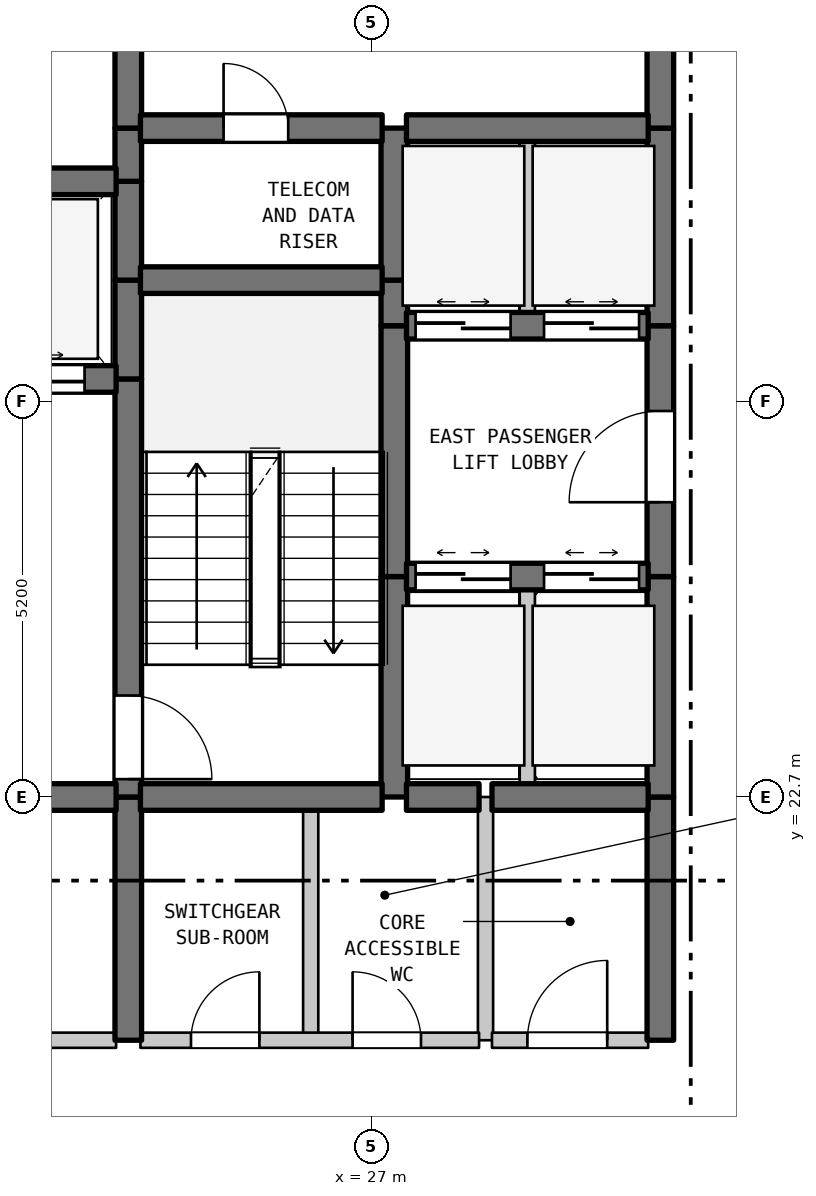
"""IFC4 building model, lengths in metres.
Left out: names, types, materials, properties, quantities, classifications, styles, units other than length and angle.
Written with IfcOpenShell. Run it as: python <this file> out.ifc"""

import sys

from ifc_helpers import new_model, si_unit, direction, frame, frame_2d, origin, place, context, subcontext, project, spatial, rectangle, extrude, element, fill, save


model = new_model("IFC4")
c1 = context("Model", 3, precision=1e-05, world=origin(), true_north=direction((0.0, 1.0)))
c2 = subcontext(c1, "Body", "Model", "MODEL_VIEW")
j1 = project(units=[si_unit("LENGTHUNIT", "METRE"), si_unit("PLANEANGLEUNIT", "RADIAN")], contexts=[c1])
p1 = place(None, origin())
s1 = spatial("IfcSite", under=j1, at=p1, CompositionType="ELEMENT")
p2 = place(p1, origin())
s2 = spatial("IfcBuilding", under=s1, at=p2, CompositionType="ELEMENT")
p3 = place(p2, frame((0.0, 0.0, 109.4)))
s3 = spatial("IfcBuildingStorey", under=s2, at=p3, CompositionType="ELEMENT", Elevation=109.4)
p4 = place(p3, frame((23.8, 19.5, 0.0), z_axis=(0.0, 0.0, 1.0), x_axis=(0.0, 1.0, 0.0)))
e1 = element("IfcWall", 1, at=p4, inside=s3, PredefinedType="SHEAR", context=c2, shape_type="SweptSolid", body=[
    extrude(rectangle(XDim=3.2, YDim=0.35, at=frame_2d((1.6, 0.0))), origin(), (0.0, 0.0, 1.0), 3.385),
])
p5 = place(p3, frame((23.8, 22.7, 0.0), z_axis=(0.0, 0.0, 1.0), x_axis=(0.0, 1.0, 0.0)))
e2 = element("IfcWall", 2, at=p5, inside=s3, PredefinedType="SHEAR", context=c2, shape_type="SweptSolid", body=[
    extrude(rectangle(XDim=5.5, YDim=0.35, at=frame_2d((2.75, 0.0))), origin(), (0.0, 0.0, 1.0), 3.385),
])
p6 = place(p5, frame((0.235, 0.0, 0.0)))
e3 = element("IfcOpeningElement", 3, at=p6, cuts=e2, PredefinedType="OPENING", context=c2, shape_type="SweptSolid", body=[
    extrude(rectangle(XDim=1.1, YDim=2.15, at=frame_2d((0.55, 1.075))), frame((0.0, 0.185, 0.0), z_axis=(0.0, -1.0, 0.0), x_axis=(1.0, 0.0, 0.0)), (0.0, 0.0, 1.0), 0.37),
])
for number, where, z_axis, x_axis in (
    (4, (23.8, 28.2, 0.0), (0.0, 0.0, 1.0), (0.0, 1.0, 0.0)),
    (5, (23.8, 29.5, 0.0), (0.0, 0.0, 1.0), (0.0, 1.0, 0.0)),
):
    element("IfcWall", number, at=place(p3, frame(where, z_axis=z_axis, x_axis=x_axis)), inside=s3, PredefinedType="SHEAR", context=c2, shape_type="SweptSolid", body=[
        extrude(rectangle(XDim=1.3, YDim=0.35, at=frame_2d((0.65, 0.0))), origin(), (0.0, 0.0, 1.0), 3.385),
    ])
p7 = place(p3, frame((23.8, 30.8, 0.0), z_axis=(0.0, 0.0, 1.0), x_axis=(0.0, 1.0, 0.0)))
e6 = element("IfcWall", 6, at=p7, inside=s3, PredefinedType="SHEAR", context=c2, shape_type="SweptSolid", body=[
    extrude(rectangle(XDim=0.7, YDim=0.35, at=frame_2d((0.35, 0.0))), origin(), (0.0, 0.0, 1.0), 3.385),
])
p8 = place(p3, frame((23.8, 31.5, 0.0), z_axis=(0.0, 0.0, 1.0), x_axis=(0.0, 1.0, 0.0)))
e7 = element("IfcWall", 7, at=p8, inside=s3, PredefinedType="SHEAR", context=c2, shape_type="SweptSolid", body=[
    extrude(rectangle(XDim=3.5, YDim=0.35, at=frame_2d((1.75, 0.0))), origin(), (0.0, 0.0, 1.0), 3.385),
])
p9 = place(p8, frame((1.127, 0.0, 0.0)))
e8 = element("IfcOpeningElement", 8, at=p9, cuts=e7, PredefinedType="OPENING", context=c2, shape_type="SweptSolid", body=[
    extrude(rectangle(XDim=1.1, YDim=2.15, at=frame_2d((0.55, 1.075))), frame((0.0, 0.185, 0.0), z_axis=(0.0, -1.0, 0.0), x_axis=(1.0, 0.0, 0.0)), (0.0, 0.0, 1.0), 0.37),
])
p10 = place(p3, frame((26.2, 19.5, 0.0), z_axis=(0.0, 0.0, 1.0), x_axis=(0.0, 1.0, 0.0)))
e9 = element("IfcWall", 9, at=p10, inside=s3, PredefinedType="STANDARD", context=c2, shape_type="SweptSolid", body=[
    extrude(rectangle(XDim=3.2, YDim=0.2, at=frame_2d((1.6, 0.0))), origin(), (0.0, 0.0, 1.0), 3.385),
])
p11 = place(p3, frame((27.3, 22.7, 0.0), z_axis=(0.0, 0.0, 1.0), x_axis=(0.0, 1.0, 0.0)))
e10 = element("IfcWall", 10, at=p11, inside=s3, PredefinedType="SHEAR", context=c2, shape_type="SweptSolid", body=[
    extrude(rectangle(XDim=2.9, YDim=0.35, at=frame_2d((1.45, 0.0))), origin(), (0.0, 0.0, 1.0), 3.385),
])
p12 = place(p3, frame((27.3, 25.6, 0.0), z_axis=(0.0, 0.0, 1.0), x_axis=(0.0, 1.0, 0.0)))
e11 = element("IfcWall", 11, at=p12, inside=s3, PredefinedType="SHEAR", context=c2, shape_type="SweptSolid", body=[
    extrude(rectangle(XDim=3.3, YDim=0.35, at=frame_2d((1.65, 0.0))), origin(), (0.0, 0.0, 1.0), 3.385),
])
p13 = place(p3, frame((27.3, 28.9, 0.0), z_axis=(0.0, 0.0, 1.0), x_axis=(0.0, 1.0, 0.0)))
e12 = element("IfcWall", 12, at=p13, inside=s3, PredefinedType="SHEAR", context=c2, shape_type="SweptSolid", body=[
    extrude(rectangle(XDim=0.6, YDim=0.35, at=frame_2d((0.3, 0.0))), origin(), (0.0, 0.0, 1.0), 3.385),
])
p14 = place(p3, frame((27.3, 29.5, 0.0), z_axis=(0.0, 0.0, 1.0), x_axis=(0.0, 1.0, 0.0)))
e13 = element("IfcWall", 13, at=p14, inside=s3, PredefinedType="SHEAR", context=c2, shape_type="SweptSolid", body=[
    extrude(rectangle(XDim=2.0, YDim=0.35, at=frame_2d((1.0, 0.0))), origin(), (0.0, 0.0, 1.0), 3.385),
])
p15 = place(p3, frame((28.5, 19.5, 0.0), z_axis=(0.0, 0.0, 1.0), x_axis=(0.0, 1.0, 0.0)))
e14 = element("IfcWall", 14, at=p15, inside=s3, PredefinedType="STANDARD", context=c2, shape_type="SweptSolid", body=[
    extrude(rectangle(XDim=3.2, YDim=0.2, at=frame_2d((1.6, 0.0))), origin(), (0.0, 0.0, 1.0), 3.385),
])
p16 = place(p3, frame((29.05, 22.7, 0.0), z_axis=(0.0, 0.0, 1.0), x_axis=(0.0, 1.0, 0.0)))
e15 = element("IfcWall", 15, at=p16, inside=s3, PredefinedType="STANDARD", context=c2, shape_type="SweptSolid", body=[
    extrude(rectangle(XDim=2.9, YDim=0.2, at=frame_2d((1.45, 0.0))), origin(), (0.0, 0.0, 1.0), 3.385),
])
p17 = place(p3, frame((29.05, 28.9, 0.0), z_axis=(0.0, 0.0, 1.0), x_axis=(0.0, 1.0, 0.0)))
e16 = element("IfcWall", 16, at=p17, inside=s3, PredefinedType="STANDARD", context=c2, shape_type="SweptSolid", body=[
    extrude(rectangle(XDim=2.6, YDim=0.2, at=frame_2d((1.3, 0.0))), origin(), (0.0, 0.0, 1.0), 3.385),
])
p18 = place(p3, frame((30.8, 19.5, 0.0), z_axis=(0.0, 0.0, 1.0), x_axis=(0.0, 1.0, 0.0)))
e17 = element("IfcWall", 17, at=p18, inside=s3, PredefinedType="SHEAR", context=c2, shape_type="SweptSolid", body=[
    extrude(rectangle(XDim=3.2, YDim=0.35, at=frame_2d((1.6, 0.0))), origin(), (0.0, 0.0, 1.0), 3.385),
])
p19 = place(p3, frame((30.8, 22.7, 0.0), z_axis=(0.0, 0.0, 1.0), x_axis=(0.0, 1.0, 0.0)))
e18 = element("IfcWall", 18, at=p19, inside=s3, PredefinedType="SHEAR", context=c2, shape_type="SweptSolid", body=[
    extrude(rectangle(XDim=2.9, YDim=0.35, at=frame_2d((1.45, 0.0))), origin(), (0.0, 0.0, 1.0), 3.385),
])
p20 = place(p3, frame((30.8, 25.6, 0.0), z_axis=(0.0, 0.0, 1.0), x_axis=(0.0, 1.0, 0.0)))
e19 = element("IfcWall", 19, at=p20, inside=s3, PredefinedType="SHEAR", context=c2, shape_type="SweptSolid", body=[
    extrude(rectangle(XDim=3.3, YDim=0.35, at=frame_2d((1.65, 0.0))), origin(), (0.0, 0.0, 1.0), 3.385),
])
p21 = place(p20, frame((0.978, 0.0, 0.0)))
e20 = element("IfcOpeningElement", 20, at=p21, cuts=e19, PredefinedType="OPENING", context=c2, shape_type="SweptSolid", body=[
    extrude(rectangle(XDim=1.2, YDim=2.2, at=frame_2d((0.6, 1.1))), frame((0.0, 0.185, 0.0), z_axis=(0.0, -1.0, 0.0), x_axis=(1.0, 0.0, 0.0)), (0.0, 0.0, 1.0), 0.37),
])
p22 = place(p3, frame((30.8, 28.9, 0.0), z_axis=(0.0, 0.0, 1.0), x_axis=(0.0, 1.0, 0.0)))
e21 = element("IfcWall", 21, at=p22, inside=s3, PredefinedType="SHEAR", context=c2, shape_type="SweptSolid", body=[
    extrude(rectangle(XDim=2.6, YDim=0.35, at=frame_2d((1.3, 0.0))), origin(), (0.0, 0.0, 1.0), 3.385),
])
p23 = place(p3, frame((30.8, 31.5, 0.0), z_axis=(0.0, 0.0, 1.0), x_axis=(0.0, 1.0, 0.0)))
e22 = element("IfcWall", 22, at=p23, inside=s3, PredefinedType="SHEAR", context=c2, shape_type="SweptSolid", body=[
    extrude(rectangle(XDim=3.5, YDim=0.35, at=frame_2d((1.75, 0.0))), origin(), (0.0, 0.0, 1.0), 3.385),
])
p24 = place(p23, frame((1.15, 0.0, 0.0)))
e23 = element("IfcOpeningElement", 23, at=p24, cuts=e22, PredefinedType="OPENING", context=c2, shape_type="SweptSolid", body=[
    extrude(rectangle(XDim=1.2, YDim=2.2, at=frame_2d((0.6, 1.1))), frame((0.0, 0.185, 0.0), z_axis=(0.0, -1.0, 0.0), x_axis=(1.0, 0.0, 0.0)), (0.0, 0.0, 1.0), 0.37),
])
p25 = place(p3, frame((19.16, 19.5, 0.0), z_axis=(0.0, 0.0, 1.0), x_axis=(1.0, 0.0, 0.0)))
e24 = element("IfcWall", 24, at=p25, inside=s3, PredefinedType="STANDARD", context=c2, shape_type="SweptSolid", body=[
    extrude(rectangle(XDim=4.48, YDim=0.2, at=frame_2d((2.24, 0.0))), origin(), (0.0, 0.0, 1.0), 3.385),
])
p26 = place(p25, frame((1.64, 0.0, 0.0)))
e25 = element("IfcOpeningElement", 25, at=p26, cuts=e24, PredefinedType="OPENING", context=c2, shape_type="SweptSolid", body=[
    extrude(rectangle(XDim=1.2, YDim=2.2, at=frame_2d((0.6, 1.1))), frame((0.0, 0.11, 0.0), z_axis=(0.0, -1.0, 0.0), x_axis=(1.0, 0.0, 0.0)), (0.0, 0.0, 1.0), 0.22),
])
p27 = place(p3, frame((23.96, 19.5, 0.0), z_axis=(0.0, 0.0, 1.0), x_axis=(1.0, 0.0, 0.0)))
e26 = element("IfcWall", 26, at=p27, inside=s3, PredefinedType="STANDARD", context=c2, shape_type="SweptSolid", body=[
    extrude(rectangle(XDim=4.455, YDim=0.2, at=frame_2d((2.228, 0.0))), origin(), (0.0, 0.0, 1.0), 3.385),
])
p28 = place(p27, frame((0.665, 0.0, 0.0)))
e27 = element("IfcOpeningElement", 27, at=p28, cuts=e26, PredefinedType="OPENING", context=c2, shape_type="SweptSolid", body=[
    extrude(rectangle(XDim=0.9, YDim=2.15, at=frame_2d((0.45, 1.075))), frame((0.0, 0.11, 0.0), z_axis=(0.0, -1.0, 0.0), x_axis=(1.0, 0.0, 0.0)), (0.0, 0.0, 1.0), 0.22),
])
p29 = place(p27, frame((2.791, 0.0, 0.0)))
e28 = element("IfcOpeningElement", 28, at=p29, cuts=e26, PredefinedType="OPENING", context=c2, shape_type="SweptSolid", body=[
    extrude(rectangle(XDim=0.9, YDim=2.15, at=frame_2d((0.45, 1.075))), frame((0.0, 0.11, 0.0), z_axis=(0.0, -1.0, 0.0), x_axis=(1.0, 0.0, 0.0)), (0.0, 0.0, 1.0), 0.22),
])
p30 = place(p3, frame((28.585, 19.5, 0.0), z_axis=(0.0, 0.0, 1.0), x_axis=(1.0, 0.0, 0.0)))
e29 = element("IfcWall", 29, at=p30, inside=s3, PredefinedType="STANDARD", context=c2, shape_type="SweptSolid", body=[
    extrude(rectangle(XDim=2.055, YDim=0.2, at=frame_2d((1.027, 0.0))), origin(), (0.0, 0.0, 1.0), 3.385),
])
p31 = place(p30, frame((0.466, 0.0, 0.0)))
e30 = element("IfcOpeningElement", 30, at=p31, cuts=e29, PredefinedType="OPENING", context=c2, shape_type="SweptSolid", body=[
    extrude(rectangle(XDim=1.05, YDim=2.15, at=frame_2d((0.525, 1.075))), frame((0.0, 0.11, 0.0), z_axis=(0.0, -1.0, 0.0), x_axis=(1.0, 0.0, 0.0)), (0.0, 0.0, 1.0), 0.22),
])
p32 = place(p3, frame((19.16, 22.7, 0.0), z_axis=(0.0, 0.0, 1.0), x_axis=(1.0, 0.0, 0.0)))
e31 = element("IfcWall", 31, at=p32, inside=s3, PredefinedType="SHEAR", context=c2, shape_type="SweptSolid", body=[
    extrude(rectangle(XDim=4.48, YDim=0.35, at=frame_2d((2.24, 0.0))), origin(), (0.0, 0.0, 1.0), 3.385),
])
p33 = place(p32, frame((1.64, 0.0, 0.0)))
e32 = element("IfcOpeningElement", 32, at=p33, cuts=e31, PredefinedType="OPENING", context=c2, shape_type="SweptSolid", body=[
    extrude(rectangle(XDim=1.2, YDim=2.2, at=frame_2d((0.6, 1.1))), frame((0.0, 0.185, 0.0), z_axis=(0.0, -1.0, 0.0), x_axis=(1.0, 0.0, 0.0)), (0.0, 0.0, 1.0), 0.37),
])
p34 = place(p3, frame((23.96, 22.7, 0.0), z_axis=(0.0, 0.0, 1.0), x_axis=(1.0, 0.0, 0.0)))
e33 = element("IfcWall", 33, at=p34, inside=s3, PredefinedType="SHEAR", context=c2, shape_type="SweptSolid", body=[
    extrude(rectangle(XDim=3.18, YDim=0.35, at=frame_2d((1.59, 0.0))), origin(), (0.0, 0.0, 1.0), 3.385),
])
p35 = place(p3, frame((27.46, 22.7, 0.0), z_axis=(0.0, 0.0, 1.0), x_axis=(1.0, 0.0, 0.0)))
e34 = element("IfcWall", 34, at=p35, inside=s3, PredefinedType="SHEAR", context=c2, shape_type="SweptSolid", body=[
    extrude(rectangle(XDim=0.955, YDim=0.35, at=frame_2d((0.478, 0.0))), origin(), (0.0, 0.0, 1.0), 3.385),
])
p36 = place(p3, frame((28.585, 22.7, 0.0), z_axis=(0.0, 0.0, 1.0), x_axis=(1.0, 0.0, 0.0)))
e35 = element("IfcWall", 35, at=p36, inside=s3, PredefinedType="SHEAR", context=c2, shape_type="SweptSolid", body=[
    extrude(rectangle(XDim=2.055, YDim=0.35, at=frame_2d((1.027, 0.0))), origin(), (0.0, 0.0, 1.0), 3.385),
])
p37 = place(p3, frame((27.46, 25.6, 0.0), z_axis=(0.0, 0.0, 1.0), x_axis=(1.0, 0.0, 0.0)))
e36 = element("IfcWall", 36, at=p37, inside=s3, PredefinedType="SHEAR", context=c2, shape_type="SweptSolid", body=[
    extrude(rectangle(XDim=3.18, YDim=0.35, at=frame_2d((1.59, 0.0))), origin(), (0.0, 0.0, 1.0), 3.385),
])
p38 = place(p37, frame((0.12, 0.0, 0.0)))
e37 = element("IfcOpeningElement", 37, at=p38, cuts=e36, PredefinedType="OPENING", context=c2, shape_type="SweptSolid", body=[
    extrude(rectangle(XDim=1.25, YDim=2.2, at=frame_2d((0.625, 1.1))), frame((0.0, 0.185, 0.0), z_axis=(0.0, -1.0, 0.0), x_axis=(1.0, 0.0, 0.0)), (0.0, 0.0, 1.0), 0.37),
])
p39 = place(p37, frame((1.81, 0.0, 0.0)))
e38 = element("IfcOpeningElement", 38, at=p39, cuts=e36, PredefinedType="OPENING", context=c2, shape_type="SweptSolid", body=[
    extrude(rectangle(XDim=1.25, YDim=2.2, at=frame_2d((0.625, 1.1))), frame((0.0, 0.185, 0.0), z_axis=(0.0, -1.0, 0.0), x_axis=(1.0, 0.0, 0.0)), (0.0, 0.0, 1.0), 0.37),
])
p40 = place(p3, frame((19.16, 28.2, 0.0), z_axis=(0.0, 0.0, 1.0), x_axis=(1.0, 0.0, 0.0)))
e39 = element("IfcWall", 39, at=p40, inside=s3, PredefinedType="SHEAR", context=c2, shape_type="SweptSolid", body=[
    extrude(rectangle(XDim=4.48, YDim=0.35, at=frame_2d((2.24, 0.0))), origin(), (0.0, 0.0, 1.0), 3.385),
])
p41 = place(p40, frame((0.415, 0.0, 0.0)))
e40 = element("IfcOpeningElement", 40, at=p41, cuts=e39, PredefinedType="OPENING", context=c2, shape_type="SweptSolid", body=[
    extrude(rectangle(XDim=1.25, YDim=2.2, at=frame_2d((0.625, 1.1))), frame((0.0, 0.185, 0.0), z_axis=(0.0, -1.0, 0.0), x_axis=(1.0, 0.0, 0.0)), (0.0, 0.0, 1.0), 0.37),
])
p42 = place(p40, frame((2.815, 0.0, 0.0)))
e41 = element("IfcOpeningElement", 41, at=p42, cuts=e39, PredefinedType="OPENING", context=c2, shape_type="SweptSolid", body=[
    extrude(rectangle(XDim=1.25, YDim=2.2, at=frame_2d((0.625, 1.1))), frame((0.0, 0.185, 0.0), z_axis=(0.0, -1.0, 0.0), x_axis=(1.0, 0.0, 0.0)), (0.0, 0.0, 1.0), 0.37),
])
p43 = place(p3, frame((27.46, 28.9, 0.0), z_axis=(0.0, 0.0, 1.0), x_axis=(1.0, 0.0, 0.0)))
e42 = element("IfcWall", 42, at=p43, inside=s3, PredefinedType="SHEAR", context=c2, shape_type="SweptSolid", body=[
    extrude(rectangle(XDim=3.18, YDim=0.35, at=frame_2d((1.59, 0.0))), origin(), (0.0, 0.0, 1.0), 3.385),
])
p44 = place(p43, frame((0.12, 0.0, 0.0)))
e43 = element("IfcOpeningElement", 43, at=p44, cuts=e42, PredefinedType="OPENING", context=c2, shape_type="SweptSolid", body=[
    extrude(rectangle(XDim=1.25, YDim=2.2, at=frame_2d((0.625, 1.1))), frame((0.0, 0.185, 0.0), z_axis=(0.0, -1.0, 0.0), x_axis=(1.0, 0.0, 0.0)), (0.0, 0.0, 1.0), 0.37),
])
p45 = place(p43, frame((1.81, 0.0, 0.0)))
e44 = element("IfcOpeningElement", 44, at=p45, cuts=e42, PredefinedType="OPENING", context=c2, shape_type="SweptSolid", body=[
    extrude(rectangle(XDim=1.25, YDim=2.2, at=frame_2d((0.625, 1.1))), frame((0.0, 0.185, 0.0), z_axis=(0.0, -1.0, 0.0), x_axis=(1.0, 0.0, 0.0)), (0.0, 0.0, 1.0), 0.37),
])
p46 = place(p3, frame((23.96, 29.5, 0.0), z_axis=(0.0, 0.0, 1.0), x_axis=(1.0, 0.0, 0.0)))
e45 = element("IfcWall", 45, at=p46, inside=s3, PredefinedType="SHEAR", context=c2, shape_type="SweptSolid", body=[
    extrude(rectangle(XDim=3.18, YDim=0.35, at=frame_2d((1.59, 0.0))), origin(), (0.0, 0.0, 1.0), 3.385),
])
p47 = place(p3, frame((19.16, 30.8, 0.0), z_axis=(0.0, 0.0, 1.0), x_axis=(1.0, 0.0, 0.0)))
e46 = element("IfcWall", 46, at=p47, inside=s3, PredefinedType="SHEAR", context=c2, shape_type="SweptSolid", body=[
    extrude(rectangle(XDim=4.48, YDim=0.35, at=frame_2d((2.24, 0.0))), origin(), (0.0, 0.0, 1.0), 3.385),
])
p48 = place(p3, frame((23.96, 31.5, 0.0), z_axis=(0.0, 0.0, 1.0), x_axis=(1.0, 0.0, 0.0)))
e47 = element("IfcWall", 47, at=p48, inside=s3, PredefinedType="SHEAR", context=c2, shape_type="SweptSolid", body=[
    extrude(rectangle(XDim=3.18, YDim=0.35, at=frame_2d((1.59, 0.0))), origin(), (0.0, 0.0, 1.0), 3.385),
])
p49 = place(p48, frame((1.094, 0.0, 0.0)))
e48 = element("IfcOpeningElement", 48, at=p49, cuts=e47, PredefinedType="OPENING", context=c2, shape_type="SweptSolid", body=[
    extrude(rectangle(XDim=0.85, YDim=2.1, at=frame_2d((0.425, 1.05))), frame((0.0, 0.185, 0.0), z_axis=(0.0, -1.0, 0.0), x_axis=(1.0, 0.0, 0.0)), (0.0, 0.0, 1.0), 0.37),
])
p50 = place(p3, frame((27.46, 31.5, 0.0), z_axis=(0.0, 0.0, 1.0), x_axis=(1.0, 0.0, 0.0)))
e49 = element("IfcWall", 49, at=p50, inside=s3, PredefinedType="SHEAR", context=c2, shape_type="SweptSolid", body=[
    extrude(rectangle(XDim=3.18, YDim=0.35, at=frame_2d((1.59, 0.0))), origin(), (0.0, 0.0, 1.0), 3.385),
])
p51 = place(p6, frame((1.1, 0.0, 0.0), z_axis=(0.0, 0.0, 1.0), x_axis=(-1.0, 0.0, 0.0)))
e50 = element("IfcDoor", 50, at=p51, inside=s3, OperationType="SINGLE_SWING_LEFT", PredefinedType="DOOR", context=c2, shape_type="SweptSolid", body=[
    extrude(rectangle(XDim=1.1, YDim=2.15, at=frame_2d((0.55, 1.075))), frame((0.0, 0.025, 0.0), z_axis=(0.0, -1.0, 0.0), x_axis=(1.0, 0.0, 0.0)), (0.0, 0.0, 1.0), 0.05),
])
fill(e3, e50)
p52 = place(p21, origin())
e51 = element("IfcDoor", 51, at=p52, inside=s3, OperationType="SINGLE_SWING_LEFT", PredefinedType="DOOR", context=c2, shape_type="SweptSolid", body=[
    extrude(rectangle(XDim=1.2, YDim=2.2, at=frame_2d((0.6, 1.1))), frame((0.0, 0.025, 0.0), z_axis=(0.0, -1.0, 0.0), x_axis=(1.0, 0.0, 0.0)), (0.0, 0.0, 1.0), 0.05),
])
fill(e20, e51)
p53 = place(p28, origin())
e52 = element("IfcDoor", 52, at=p53, inside=s3, OperationType="SINGLE_SWING_RIGHT", PredefinedType="DOOR", context=c2, shape_type="SweptSolid", body=[
    extrude(rectangle(XDim=0.9, YDim=2.15, at=frame_2d((0.45, 1.075))), frame((0.0, 0.025, 0.0), z_axis=(0.0, -1.0, 0.0), x_axis=(1.0, 0.0, 0.0)), (0.0, 0.0, 1.0), 0.05),
])
fill(e27, e52)
p54 = place(p29, origin())
e53 = element("IfcDoor", 53, at=p54, inside=s3, OperationType="SINGLE_SWING_LEFT", PredefinedType="DOOR", context=c2, shape_type="SweptSolid", body=[
    extrude(rectangle(XDim=0.9, YDim=2.15, at=frame_2d((0.45, 1.075))), frame((0.0, 0.025, 0.0), z_axis=(0.0, -1.0, 0.0), x_axis=(1.0, 0.0, 0.0)), (0.0, 0.0, 1.0), 0.05),
])
fill(e28, e53)
p55 = place(p31, origin())
e54 = element("IfcDoor", 54, at=p55, inside=s3, OperationType="SINGLE_SWING_RIGHT", PredefinedType="DOOR", context=c2, shape_type="SweptSolid", body=[
    extrude(rectangle(XDim=1.05, YDim=2.15, at=frame_2d((0.525, 1.075))), frame((0.0, 0.025, 0.0), z_axis=(0.0, -1.0, 0.0), x_axis=(1.0, 0.0, 0.0)), (0.0, 0.0, 1.0), 0.05),
])
fill(e30, e54)
p56 = place(p38, origin())
e55 = element("IfcDoor", 55, at=p56, inside=s3, OperationType="DOUBLE_DOOR_SLIDING", PredefinedType="DOOR", context=c2, shape_type="SweptSolid", body=[
    extrude(rectangle(XDim=1.25, YDim=2.2, at=frame_2d((0.625, 1.1))), frame((0.0, 0.025, 0.0), z_axis=(0.0, -1.0, 0.0), x_axis=(1.0, 0.0, 0.0)), (0.0, 0.0, 1.0), 0.05),
])
fill(e37, e55)
p57 = place(p39, origin())
e56 = element("IfcDoor", 56, at=p57, inside=s3, OperationType="DOUBLE_DOOR_SLIDING", PredefinedType="DOOR", context=c2, shape_type="SweptSolid", body=[
    extrude(rectangle(XDim=1.25, YDim=2.2, at=frame_2d((0.625, 1.1))), frame((0.0, 0.025, 0.0), z_axis=(0.0, -1.0, 0.0), x_axis=(1.0, 0.0, 0.0)), (0.0, 0.0, 1.0), 0.05),
])
fill(e38, e56)
p58 = place(p42, origin())
e57 = element("IfcDoor", 57, at=p58, inside=s3, OperationType="DOUBLE_DOOR_SLIDING", PredefinedType="DOOR", context=c2, shape_type="SweptSolid", body=[
    extrude(rectangle(XDim=1.25, YDim=2.2, at=frame_2d((0.625, 1.1))), frame((0.0, 0.025, 0.0), z_axis=(0.0, -1.0, 0.0), x_axis=(1.0, 0.0, 0.0)), (0.0, 0.0, 1.0), 0.05),
])
fill(e41, e57)
p59 = place(p44, origin())
e58 = element("IfcDoor", 58, at=p59, inside=s3, OperationType="DOUBLE_DOOR_SLIDING", PredefinedType="DOOR", context=c2, shape_type="SweptSolid", body=[
    extrude(rectangle(XDim=1.25, YDim=2.2, at=frame_2d((0.625, 1.1))), frame((0.0, 0.025, 0.0), z_axis=(0.0, -1.0, 0.0), x_axis=(1.0, 0.0, 0.0)), (0.0, 0.0, 1.0), 0.05),
])
fill(e43, e58)
p60 = place(p45, origin())
e59 = element("IfcDoor", 59, at=p60, inside=s3, OperationType="DOUBLE_DOOR_SLIDING", PredefinedType="DOOR", context=c2, shape_type="SweptSolid", body=[
    extrude(rectangle(XDim=1.25, YDim=2.2, at=frame_2d((0.625, 1.1))), frame((0.0, 0.025, 0.0), z_axis=(0.0, -1.0, 0.0), x_axis=(1.0, 0.0, 0.0)), (0.0, 0.0, 1.0), 0.05),
])
fill(e44, e59)
p61 = place(p49, origin())
e60 = element("IfcDoor", 60, at=p61, inside=s3, OperationType="SINGLE_SWING_LEFT", PredefinedType="DOOR", context=c2, shape_type="SweptSolid", body=[
    extrude(rectangle(XDim=0.85, YDim=2.1, at=frame_2d((0.425, 1.05))), frame((0.0, 0.025, 0.0), z_axis=(0.0, -1.0, 0.0), x_axis=(1.0, 0.0, 0.0)), (0.0, 0.0, 1.0), 0.05),
])
fill(e48, e60)
save(model, sys.argv[1])
